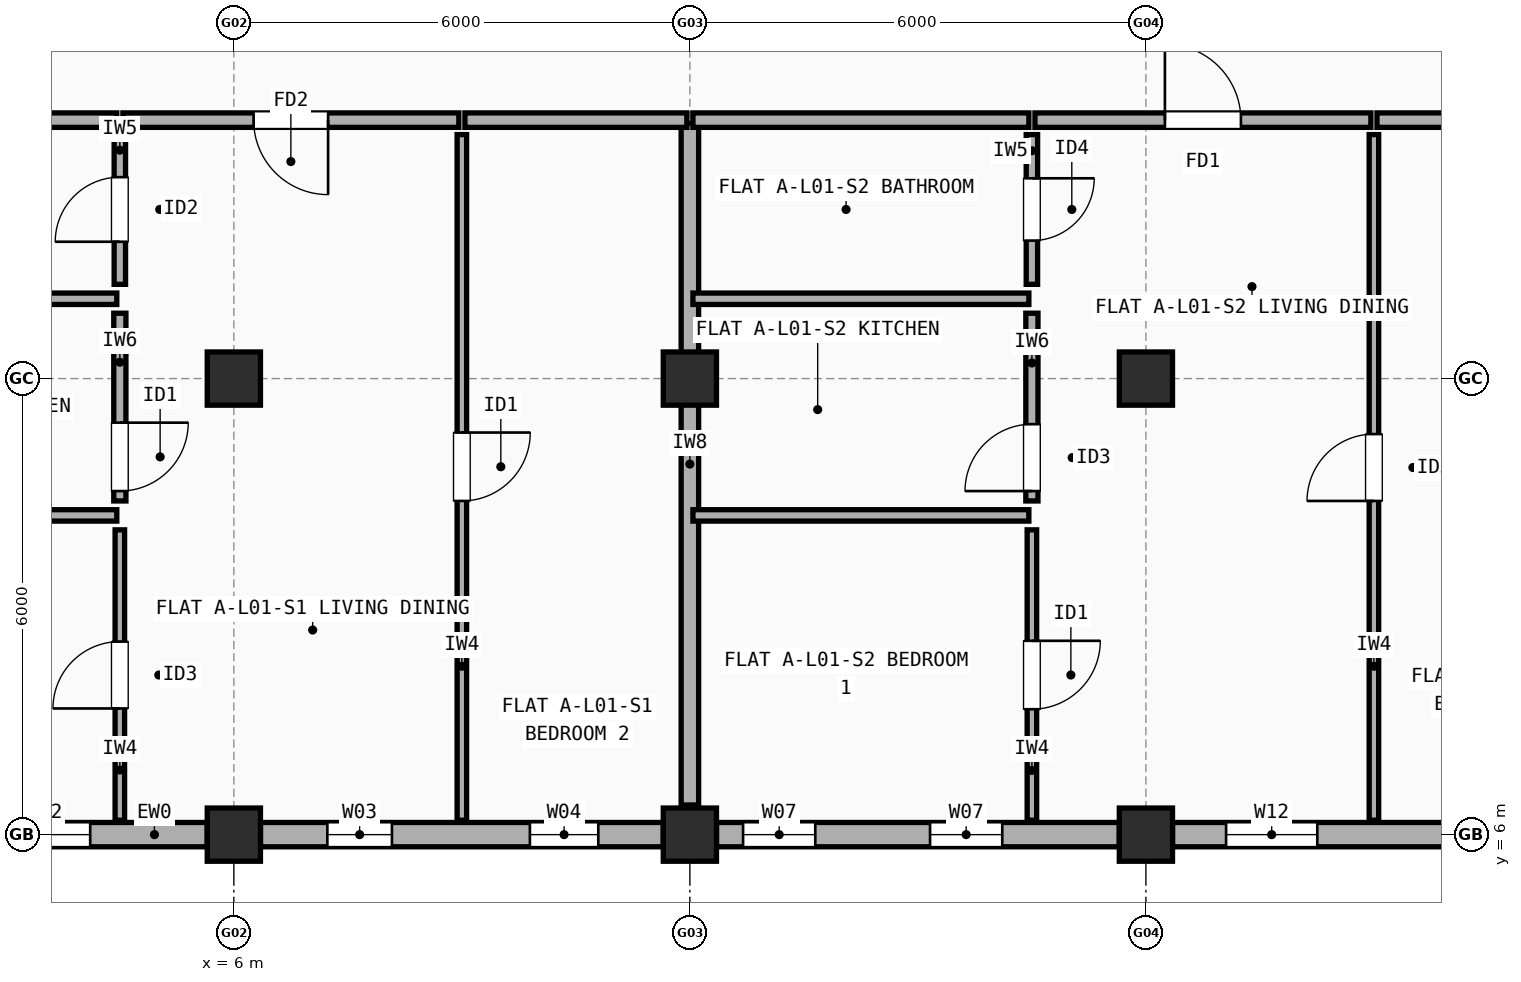
"""IFC4 building model, lengths in metres.
Left out: names, types, materials, properties, quantities, classifications, styles, units other than length and angle.
Written with IfcOpenShell. Run it as: python <this file> out.ifc"""

import sys

from ifc_helpers import new_model, si_unit, direction, frame, frame_2d, origin, origin_2d, place, context, subcontext, project, spatial, rectangle, extrude, element, fill, save


model = new_model("IFC4")
c1 = context("Model", 3, precision=1e-05, world=origin(), true_north=direction((0.0, 1.0)))
c2 = subcontext(c1, "Body", "Model", "MODEL_VIEW")
j1 = project(units=[si_unit("LENGTHUNIT", "METRE"), si_unit("PLANEANGLEUNIT", "RADIAN")], contexts=[c1])
p1 = place(None, origin())
s1 = spatial("IfcSite", under=j1, at=p1, CompositionType="ELEMENT")
p2 = place(p1, origin())
s2 = spatial("IfcBuilding", under=s1, at=p2, CompositionType="ELEMENT")
p3 = place(p2, frame((0.0, 0.0, 4.5)))
s3 = spatial("IfcBuildingStorey", under=s2, at=p3, CompositionType="ELEMENT", Elevation=4.5)
for number, where, z_axis, x_axis in (
    (1, (6.0, 6.0, 0.0), (0.0, 0.0, 1.0), (1.0, 0.0, 0.0)),
    (2, (6.0, 12.0, 0.0), (0.0, 0.0, 1.0), (1.0, 0.0, 0.0)),
    (3, (12.0, 6.0, 0.0), (0.0, 0.0, 1.0), (1.0, 0.0, 0.0)),
    (4, (12.0, 12.0, 0.0), (0.0, 0.0, 1.0), (1.0, 0.0, 0.0)),
    (5, (18.0, 6.0, 0.0), (0.0, 0.0, 1.0), (1.0, 0.0, 0.0)),
    (6, (18.0, 12.0, 0.0), (0.0, 0.0, 1.0), (1.0, 0.0, 0.0)),
):
    element("IfcColumn", number, at=place(p3, frame(where, z_axis=z_axis, x_axis=x_axis)), inside=s3, PredefinedType="COLUMN", context=c2, shape_type="SweptSolid", body=[
        extrude(rectangle(XDim=0.7, YDim=0.7, at=origin_2d()), origin(), (0.0, 0.0, 1.0), 2.945),
    ])
p4 = place(p3, frame((0.3, 6.0, 0.0), z_axis=(0.0, 0.0, 1.0), x_axis=(1.0, 0.0, 0.0)))
e7 = element("IfcWall", 7, at=p4, inside=s3, PredefinedType="STANDARD", context=c2, shape_type="SweptSolid", body=[
    extrude(rectangle(XDim=5.35, YDim=0.32, at=frame_2d((2.675, 0.0))), origin(), (0.0, 0.0, 1.0), 2.427),
])
p5 = place(p4, frame((0.35, 0.0, 0.9)))
e8 = element("IfcOpeningElement", 8, at=p5, cuts=e7, PredefinedType="OPENING", context=c2, shape_type="SweptSolid", body=[
    extrude(rectangle(XDim=1.2, YDim=1.35, at=frame_2d((0.6, 0.675))), frame((0.0, 0.17, 0.0), z_axis=(0.0, -1.0, 0.0), x_axis=(1.0, 0.0, 0.0)), (0.0, 0.0, 1.0), 0.34),
])
p6 = place(p4, frame((2.61, 0.0, 0.9)))
e9 = element("IfcOpeningElement", 9, at=p6, cuts=e7, PredefinedType="OPENING", context=c2, shape_type="SweptSolid", body=[
    extrude(rectangle(XDim=1.2, YDim=1.35, at=frame_2d((0.6, 0.675))), frame((0.0, 0.17, 0.0), z_axis=(0.0, -1.0, 0.0), x_axis=(1.0, 0.0, 0.0)), (0.0, 0.0, 1.0), 0.34),
])
p7 = place(p3, frame((6.35, 6.0, 0.0), z_axis=(0.0, 0.0, 1.0), x_axis=(1.0, 0.0, 0.0)))
e10 = element("IfcWall", 10, at=p7, inside=s3, PredefinedType="STANDARD", context=c2, shape_type="SweptSolid", body=[
    extrude(rectangle(XDim=5.3, YDim=0.32, at=frame_2d((2.65, 0.0))), origin(), (0.0, 0.0, 1.0), 2.427),
])
p8 = place(p7, frame((0.88, 0.0, 0.9)))
e11 = element("IfcOpeningElement", 11, at=p8, cuts=e10, PredefinedType="OPENING", context=c2, shape_type="SweptSolid", body=[
    extrude(rectangle(XDim=0.85, YDim=1.25, at=frame_2d((0.425, 0.625))), frame((0.0, 0.17, 0.0), z_axis=(0.0, -1.0, 0.0), x_axis=(1.0, 0.0, 0.0)), (0.0, 0.0, 1.0), 0.34),
])
p9 = place(p7, frame((3.545, 0.0, 0.9)))
e12 = element("IfcOpeningElement", 12, at=p9, cuts=e10, PredefinedType="OPENING", context=c2, shape_type="SweptSolid", body=[
    extrude(rectangle(XDim=0.9, YDim=1.3, at=frame_2d((0.45, 0.65))), frame((0.0, 0.17, 0.0), z_axis=(0.0, -1.0, 0.0), x_axis=(1.0, 0.0, 0.0)), (0.0, 0.0, 1.0), 0.34),
])
p10 = place(p3, frame((12.35, 6.0, 0.0), z_axis=(0.0, 0.0, 1.0), x_axis=(1.0, 0.0, 0.0)))
e13 = element("IfcWall", 13, at=p10, inside=s3, PredefinedType="STANDARD", context=c2, shape_type="SweptSolid", body=[
    extrude(rectangle(XDim=5.3, YDim=0.32, at=frame_2d((2.65, 0.0))), origin(), (0.0, 0.0, 1.0), 2.427),
])
p11 = place(p10, frame((0.35, 0.0, 0.9)))
e14 = element("IfcOpeningElement", 14, at=p11, cuts=e13, PredefinedType="OPENING", context=c2, shape_type="SweptSolid", body=[
    extrude(rectangle(XDim=0.95, YDim=1.35, at=frame_2d((0.475, 0.675))), frame((0.0, 0.17, 0.0), z_axis=(0.0, -1.0, 0.0), x_axis=(1.0, 0.0, 0.0)), (0.0, 0.0, 1.0), 0.34),
])
p12 = place(p10, frame((2.81, 0.0, 0.9)))
e15 = element("IfcOpeningElement", 15, at=p12, cuts=e13, PredefinedType="OPENING", context=c2, shape_type="SweptSolid", body=[
    extrude(rectangle(XDim=0.95, YDim=1.35, at=frame_2d((0.475, 0.675))), frame((0.0, 0.17, 0.0), z_axis=(0.0, -1.0, 0.0), x_axis=(1.0, 0.0, 0.0)), (0.0, 0.0, 1.0), 0.34),
])
p13 = place(p3, frame((18.35, 6.0, 0.0), z_axis=(0.0, 0.0, 1.0), x_axis=(1.0, 0.0, 0.0)))
e16 = element("IfcWall", 16, at=p13, inside=s3, PredefinedType="STANDARD", context=c2, shape_type="SweptSolid", body=[
    extrude(rectangle(XDim=5.3, YDim=0.32, at=frame_2d((2.65, 0.0))), origin(), (0.0, 0.0, 1.0), 2.427),
])
p14 = place(p13, frame((0.705, 0.0, 0.9)))
e17 = element("IfcOpeningElement", 17, at=p14, cuts=e16, PredefinedType="OPENING", context=c2, shape_type="SweptSolid", body=[
    extrude(rectangle(XDim=1.2, YDim=1.35, at=frame_2d((0.6, 0.675))), frame((0.0, 0.17, 0.0), z_axis=(0.0, -1.0, 0.0), x_axis=(1.0, 0.0, 0.0)), (0.0, 0.0, 1.0), 0.34),
])
p15 = place(p13, frame((3.595, 0.0, 0.9)))
e18 = element("IfcOpeningElement", 18, at=p15, cuts=e16, PredefinedType="OPENING", context=c2, shape_type="SweptSolid", body=[
    extrude(rectangle(XDim=0.8, YDim=1.2, at=frame_2d((0.4, 0.6))), frame((0.0, 0.17, 0.0), z_axis=(0.0, -1.0, 0.0), x_axis=(1.0, 0.0, 0.0)), (0.0, 0.0, 1.0), 0.34),
])
p16 = place(p3, frame((12.0, 6.39, 0.0), z_axis=(0.0, 0.0, 1.0), x_axis=(0.0, 1.0, 0.0)))
e19 = element("IfcWall", 19, at=p16, inside=s3, PredefinedType="SOLIDWALL", context=c2, shape_type="SweptSolid", body=[
    extrude(rectangle(XDim=8.97, YDim=0.23, at=frame_2d((4.485, 0.0))), origin(), (0.0, 0.0, 1.0), 2.327),
])
p17 = place(p3, frame((0.04, 15.4, 0.0), z_axis=(0.0, 0.0, 1.0), x_axis=(1.0, 0.0, 0.0)))
e20 = element("IfcWall", 20, at=p17, inside=s3, PredefinedType="SOLIDWALL", context=c2, shape_type="SweptSolid", body=[
    extrude(rectangle(XDim=4.42, YDim=0.19, at=frame_2d((2.21, 0.0))), origin(), (0.0, 0.0, 1.0), 2.427),
])
p18 = place(p3, frame((4.54, 15.4, 0.0), z_axis=(0.0, 0.0, 1.0), x_axis=(1.0, 0.0, 0.0)))
e21 = element("IfcWall", 21, at=p18, inside=s3, PredefinedType="SOLIDWALL", context=c2, shape_type="SweptSolid", body=[
    extrude(rectangle(XDim=4.42, YDim=0.19, at=frame_2d((2.21, 0.0))), origin(), (0.0, 0.0, 1.0), 2.327),
])
p19 = place(p18, frame((1.72, 0.0, 0.0)))
e22 = element("IfcOpeningElement", 22, at=p19, cuts=e21, PredefinedType="OPENING", context=c2, shape_type="SweptSolid", body=[
    extrude(rectangle(XDim=0.98, YDim=2.15, at=frame_2d((0.49, 1.075))), frame((0.0, 0.105, 0.0), z_axis=(0.0, -1.0, 0.0), x_axis=(1.0, 0.0, 0.0)), (0.0, 0.0, 1.0), 0.21),
])
p20 = place(p3, frame((4.5, 6.19, 0.0), z_axis=(0.0, 0.0, 1.0), x_axis=(0.0, 1.0, 0.0)))
e23 = element("IfcWall", 23, at=p20, inside=s3, PredefinedType="PARTITIONING", context=c2, shape_type="SweptSolid", body=[
    extrude(rectangle(XDim=3.82, YDim=0.125, at=frame_2d((1.91, 0.0))), origin(), (0.0, 0.0, 1.0), 2.945),
])
p21 = place(p20, frame((1.47, 0.0, 0.0)))
e24 = element("IfcOpeningElement", 24, at=p21, cuts=e23, PredefinedType="OPENING", context=c2, shape_type="SweptSolid", body=[
    extrude(rectangle(XDim=0.88, YDim=2.1, at=frame_2d((0.44, 1.05))), frame((0.0, 0.073, 0.0), z_axis=(0.0, -1.0, 0.0), x_axis=(1.0, 0.0, 0.0)), (0.0, 0.0, 1.0), 0.145),
])
p22 = place(p3, frame((4.5, 10.39, 0.0), z_axis=(0.0, 0.0, 1.0), x_axis=(0.0, 1.0, 0.0)))
e25 = element("IfcWall", 25, at=p22, inside=s3, PredefinedType="PLUMBINGWALL", context=c2, shape_type="SweptSolid", body=[
    extrude(rectangle(XDim=2.47, YDim=0.16, at=frame_2d((1.235, 0.0))), origin(), (0.0, 0.0, 1.0), 2.377),
])
p23 = place(p22, frame((0.13, 0.0, 0.0)))
e26 = element("IfcOpeningElement", 26, at=p23, cuts=e25, PredefinedType="OPENING", context=c2, shape_type="SweptSolid", body=[
    extrude(rectangle(XDim=0.9, YDim=2.1, at=frame_2d((0.45, 1.05))), frame((0.0, 0.09, 0.0), z_axis=(0.0, -1.0, 0.0), x_axis=(1.0, 0.0, 0.0)), (0.0, 0.0, 1.0), 0.18),
])
p24 = place(p3, frame((4.5, 13.24, 0.0), z_axis=(0.0, 0.0, 1.0), x_axis=(0.0, 1.0, 0.0)))
e27 = element("IfcWall", 27, at=p24, inside=s3, PredefinedType="PARTITIONING", context=c2, shape_type="SweptSolid", body=[
    extrude(rectangle(XDim=1.97, YDim=0.15, at=frame_2d((0.985, 0.0))), origin(), (0.0, 0.0, 1.0), 2.945),
])
p25 = place(p24, frame((0.56, 0.0, 0.0)))
e28 = element("IfcOpeningElement", 28, at=p25, cuts=e27, PredefinedType="OPENING", context=c2, shape_type="SweptSolid", body=[
    extrude(rectangle(XDim=0.85, YDim=2.1, at=frame_2d((0.425, 1.05))), frame((0.0, 0.085, 0.0), z_axis=(0.0, -1.0, 0.0), x_axis=(1.0, 0.0, 0.0)), (0.0, 0.0, 1.0), 0.17),
])
for number, where, z_axis, x_axis in (
    (29, (0.04, 10.2, 0.0), (0.0, 0.0, 1.0), (1.0, 0.0, 0.0)),
    (30, (0.04, 13.05, 0.0), (0.0, 0.0, 1.0), (1.0, 0.0, 0.0)),
):
    element("IfcWall", number, at=place(p3, frame(where, z_axis=z_axis, x_axis=x_axis)), inside=s3, PredefinedType="PARTITIONING", context=c2, shape_type="SweptSolid", body=[
        extrude(rectangle(XDim=4.42, YDim=0.15, at=frame_2d((2.21, 0.0))), origin(), (0.0, 0.0, 1.0), 2.427),
    ])
p26 = place(p3, frame((9.04, 15.4, 0.0), z_axis=(0.0, 0.0, 1.0), x_axis=(1.0, 0.0, 0.0)))
e31 = element("IfcWall", 31, at=p26, inside=s3, PredefinedType="SOLIDWALL", context=c2, shape_type="SweptSolid", body=[
    extrude(rectangle(XDim=2.92, YDim=0.19, at=frame_2d((1.46, 0.0))), origin(), (0.0, 0.0, 1.0), 2.327),
])
p27 = place(p3, frame((9.0, 6.19, 0.0), z_axis=(0.0, 0.0, 1.0), x_axis=(0.0, 1.0, 0.0)))
e32 = element("IfcWall", 32, at=p27, inside=s3, PredefinedType="PARTITIONING", context=c2, shape_type="SweptSolid", body=[
    extrude(rectangle(XDim=9.02, YDim=0.125, at=frame_2d((4.51, 0.0))), origin(), (0.0, 0.0, 1.0), 2.377),
])
p28 = place(p27, frame((4.2, 0.0, 0.0)))
e33 = element("IfcOpeningElement", 33, at=p28, cuts=e32, PredefinedType="OPENING", context=c2, shape_type="SweptSolid", body=[
    extrude(rectangle(XDim=0.9, YDim=2.1, at=frame_2d((0.45, 1.05))), frame((0.0, 0.073, 0.0), z_axis=(0.0, -1.0, 0.0), x_axis=(1.0, 0.0, 0.0)), (0.0, 0.0, 1.0), 0.145),
])
p29 = place(p3, frame((12.04, 15.4, 0.0), z_axis=(0.0, 0.0, 1.0), x_axis=(1.0, 0.0, 0.0)))
e34 = element("IfcWall", 34, at=p29, inside=s3, PredefinedType="SOLIDWALL", context=c2, shape_type="SweptSolid", body=[
    extrude(rectangle(XDim=4.42, YDim=0.19, at=frame_2d((2.21, 0.0))), origin(), (0.0, 0.0, 1.0), 2.327),
])
p30 = place(p3, frame((16.54, 15.4, 0.0), z_axis=(0.0, 0.0, 1.0), x_axis=(1.0, 0.0, 0.0)))
e35 = element("IfcWall", 35, at=p30, inside=s3, PredefinedType="SOLIDWALL", context=c2, shape_type="SweptSolid", body=[
    extrude(rectangle(XDim=4.42, YDim=0.19, at=frame_2d((2.21, 0.0))), origin(), (0.0, 0.0, 1.0), 2.327),
])
p31 = place(p30, frame((1.71, 0.0, 0.0)))
e36 = element("IfcOpeningElement", 36, at=p31, cuts=e35, PredefinedType="OPENING", context=c2, shape_type="SweptSolid", body=[
    extrude(rectangle(XDim=1.0, YDim=2.15, at=frame_2d((0.5, 1.075))), frame((0.0, 0.105, 0.0), z_axis=(0.0, -1.0, 0.0), x_axis=(1.0, 0.0, 0.0)), (0.0, 0.0, 1.0), 0.21),
])
p32 = place(p3, frame((16.5, 6.19, 0.0), z_axis=(0.0, 0.0, 1.0), x_axis=(0.0, 1.0, 0.0)))
e37 = element("IfcWall", 37, at=p32, inside=s3, PredefinedType="PARTITIONING", context=c2, shape_type="SweptSolid", body=[
    extrude(rectangle(XDim=3.82, YDim=0.125, at=frame_2d((1.91, 0.0))), origin(), (0.0, 0.0, 1.0), 2.945),
])
p33 = place(p32, frame((1.46, 0.0, 0.0)))
e38 = element("IfcOpeningElement", 38, at=p33, cuts=e37, PredefinedType="OPENING", context=c2, shape_type="SweptSolid", body=[
    extrude(rectangle(XDim=0.9, YDim=2.1, at=frame_2d((0.45, 1.05))), frame((0.0, 0.073, 0.0), z_axis=(0.0, -1.0, 0.0), x_axis=(1.0, 0.0, 0.0)), (0.0, 0.0, 1.0), 0.145),
])
p34 = place(p3, frame((16.5, 10.39, 0.0), z_axis=(0.0, 0.0, 1.0), x_axis=(0.0, 1.0, 0.0)))
e39 = element("IfcWall", 39, at=p34, inside=s3, PredefinedType="PLUMBINGWALL", context=c2, shape_type="SweptSolid", body=[
    extrude(rectangle(XDim=2.47, YDim=0.16, at=frame_2d((1.235, 0.0))), origin(), (0.0, 0.0, 1.0), 2.377),
])
p35 = place(p34, frame((0.13, 0.0, 0.0)))
e40 = element("IfcOpeningElement", 40, at=p35, cuts=e39, PredefinedType="OPENING", context=c2, shape_type="SweptSolid", body=[
    extrude(rectangle(XDim=0.88, YDim=2.1, at=frame_2d((0.44, 1.05))), frame((0.0, 0.09, 0.0), z_axis=(0.0, -1.0, 0.0), x_axis=(1.0, 0.0, 0.0)), (0.0, 0.0, 1.0), 0.18),
])
p36 = place(p3, frame((16.5, 13.24, 0.0), z_axis=(0.0, 0.0, 1.0), x_axis=(0.0, 1.0, 0.0)))
e41 = element("IfcWall", 41, at=p36, inside=s3, PredefinedType="PARTITIONING", context=c2, shape_type="SweptSolid", body=[
    extrude(rectangle(XDim=1.97, YDim=0.15, at=frame_2d((0.985, 0.0))), origin(), (0.0, 0.0, 1.0), 2.945),
])
p37 = place(p36, frame((0.575, 0.0, 0.0)))
e42 = element("IfcOpeningElement", 42, at=p37, cuts=e41, PredefinedType="OPENING", context=c2, shape_type="SweptSolid", body=[
    extrude(rectangle(XDim=0.82, YDim=2.08, at=frame_2d((0.41, 1.04))), frame((0.0, 0.085, 0.0), z_axis=(0.0, -1.0, 0.0), x_axis=(1.0, 0.0, 0.0)), (0.0, 0.0, 1.0), 0.17),
])
for number, where, z_axis, x_axis in (
    (43, (12.04, 10.2, 0.0), (0.0, 0.0, 1.0), (1.0, 0.0, 0.0)),
    (44, (12.04, 13.05, 0.0), (0.0, 0.0, 1.0), (1.0, 0.0, 0.0)),
):
    element("IfcWall", number, at=place(p3, frame(where, z_axis=z_axis, x_axis=x_axis)), inside=s3, PredefinedType="PARTITIONING", context=c2, shape_type="SweptSolid", body=[
        extrude(rectangle(XDim=4.42, YDim=0.15, at=frame_2d((2.21, 0.0))), origin(), (0.0, 0.0, 1.0), 2.327),
    ])
p38 = place(p3, frame((21.04, 15.4, 0.0), z_axis=(0.0, 0.0, 1.0), x_axis=(1.0, 0.0, 0.0)))
e45 = element("IfcWall", 45, at=p38, inside=s3, PredefinedType="SOLIDWALL", context=c2, shape_type="SweptSolid", body=[
    extrude(rectangle(XDim=2.92, YDim=0.19, at=frame_2d((1.46, 0.0))), origin(), (0.0, 0.0, 1.0), 2.327),
])
p39 = place(p3, frame((21.0, 6.19, 0.0), z_axis=(0.0, 0.0, 1.0), x_axis=(0.0, 1.0, 0.0)))
e46 = element("IfcWall", 46, at=p39, inside=s3, PredefinedType="PARTITIONING", context=c2, shape_type="SweptSolid", body=[
    extrude(rectangle(XDim=9.02, YDim=0.125, at=frame_2d((4.51, 0.0))), origin(), (0.0, 0.0, 1.0), 2.377),
])
p40 = place(p39, frame((4.2, 0.0, 0.0)))
e47 = element("IfcOpeningElement", 47, at=p40, cuts=e46, PredefinedType="OPENING", context=c2, shape_type="SweptSolid", body=[
    extrude(rectangle(XDim=0.88, YDim=2.1, at=frame_2d((0.44, 1.05))), frame((0.0, 0.073, 0.0), z_axis=(0.0, -1.0, 0.0), x_axis=(1.0, 0.0, 0.0)), (0.0, 0.0, 1.0), 0.145),
])
p41 = place(p6, origin())
e48 = element("IfcWindow", 48, at=p41, inside=s3, PartitioningType="SINGLE_PANEL", PredefinedType="WINDOW", context=c2, shape_type="SweptSolid", body=[
    extrude(rectangle(XDim=1.2, YDim=1.35, at=frame_2d((0.6, 0.675))), frame((0.0, 0.03, 0.0), z_axis=(0.0, -1.0, 0.0), x_axis=(1.0, 0.0, 0.0)), (0.0, 0.0, 1.0), 0.06),
])
fill(e9, e48)
p42 = place(p8, origin())
e49 = element("IfcWindow", 49, at=p42, inside=s3, PartitioningType="SINGLE_PANEL", PredefinedType="WINDOW", context=c2, shape_type="SweptSolid", body=[
    extrude(rectangle(XDim=0.85, YDim=1.25, at=frame_2d((0.425, 0.625))), frame((0.0, 0.03, 0.0), z_axis=(0.0, -1.0, 0.0), x_axis=(1.0, 0.0, 0.0)), (0.0, 0.0, 1.0), 0.06),
])
fill(e11, e49)
p43 = place(p9, origin())
e50 = element("IfcWindow", 50, at=p43, inside=s3, PartitioningType="SINGLE_PANEL", PredefinedType="WINDOW", context=c2, shape_type="SweptSolid", body=[
    extrude(rectangle(XDim=0.9, YDim=1.3, at=frame_2d((0.45, 0.65))), frame((0.0, 0.03, 0.0), z_axis=(0.0, -1.0, 0.0), x_axis=(1.0, 0.0, 0.0)), (0.0, 0.0, 1.0), 0.06),
])
fill(e12, e50)
p44 = place(p11, origin())
e51 = element("IfcWindow", 51, at=p44, inside=s3, PartitioningType="SINGLE_PANEL", PredefinedType="WINDOW", context=c2, shape_type="SweptSolid", body=[
    extrude(rectangle(XDim=0.95, YDim=1.35, at=frame_2d((0.475, 0.675))), frame((0.0, 0.03, 0.0), z_axis=(0.0, -1.0, 0.0), x_axis=(1.0, 0.0, 0.0)), (0.0, 0.0, 1.0), 0.06),
])
fill(e14, e51)
p45 = place(p12, origin())
e52 = element("IfcWindow", 52, at=p45, inside=s3, PartitioningType="SINGLE_PANEL", PredefinedType="WINDOW", context=c2, shape_type="SweptSolid", body=[
    extrude(rectangle(XDim=0.95, YDim=1.35, at=frame_2d((0.475, 0.675))), frame((0.0, 0.03, 0.0), z_axis=(0.0, -1.0, 0.0), x_axis=(1.0, 0.0, 0.0)), (0.0, 0.0, 1.0), 0.06),
])
fill(e15, e52)
p46 = place(p14, origin())
e53 = element("IfcWindow", 53, at=p46, inside=s3, PartitioningType="SINGLE_PANEL", PredefinedType="WINDOW", context=c2, shape_type="SweptSolid", body=[
    extrude(rectangle(XDim=1.2, YDim=1.35, at=frame_2d((0.6, 0.675))), frame((0.0, 0.03, 0.0), z_axis=(0.0, -1.0, 0.0), x_axis=(1.0, 0.0, 0.0)), (0.0, 0.0, 1.0), 0.06),
])
fill(e17, e53)
p47 = place(p19, origin())
e54 = element("IfcDoor", 54, at=p47, inside=s3, OperationType="SINGLE_SWING_RIGHT", PredefinedType="DOOR", context=c2, shape_type="SweptSolid", body=[
    extrude(rectangle(XDim=0.98, YDim=2.15, at=frame_2d((0.49, 1.075))), frame((0.0, 0.025, 0.0), z_axis=(0.0, -1.0, 0.0), x_axis=(1.0, 0.0, 0.0)), (0.0, 0.0, 1.0), 0.05),
])
fill(e22, e54)
p48 = place(p21, origin())
e55 = element("IfcDoor", 55, at=p48, inside=s3, OperationType="SINGLE_SWING_LEFT", PredefinedType="DOOR", context=c2, shape_type="SweptSolid", body=[
    extrude(rectangle(XDim=0.88, YDim=2.1, at=frame_2d((0.44, 1.05))), frame((0.0, 0.025, 0.0), z_axis=(0.0, -1.0, 0.0), x_axis=(1.0, 0.0, 0.0)), (0.0, 0.0, 1.0), 0.05),
])
fill(e24, e55)
p49 = place(p23, origin())
e56 = element("IfcDoor", 56, at=p49, inside=s3, OperationType="SINGLE_SWING_RIGHT", PredefinedType="DOOR", context=c2, shape_type="SweptSolid", body=[
    extrude(rectangle(XDim=0.9, YDim=2.1, at=frame_2d((0.45, 1.05))), frame((0.0, 0.025, 0.0), z_axis=(0.0, -1.0, 0.0), x_axis=(1.0, 0.0, 0.0)), (0.0, 0.0, 1.0), 0.05),
])
fill(e26, e56)
p50 = place(p25, origin())
e57 = element("IfcDoor", 57, at=p50, inside=s3, OperationType="SINGLE_SWING_LEFT", PredefinedType="DOOR", context=c2, shape_type="SweptSolid", body=[
    extrude(rectangle(XDim=0.85, YDim=2.1, at=frame_2d((0.425, 1.05))), frame((0.0, 0.025, 0.0), z_axis=(0.0, -1.0, 0.0), x_axis=(1.0, 0.0, 0.0)), (0.0, 0.0, 1.0), 0.05),
])
fill(e28, e57)
p51 = place(p28, origin())
e58 = element("IfcDoor", 58, at=p51, inside=s3, OperationType="SINGLE_SWING_RIGHT", PredefinedType="DOOR", context=c2, shape_type="SweptSolid", body=[
    extrude(rectangle(XDim=0.9, YDim=2.1, at=frame_2d((0.45, 1.05))), frame((0.0, 0.025, 0.0), z_axis=(0.0, -1.0, 0.0), x_axis=(1.0, 0.0, 0.0)), (0.0, 0.0, 1.0), 0.05),
])
fill(e33, e58)
p52 = place(p31, origin())
e59 = element("IfcDoor", 59, at=p52, inside=s3, OperationType="SINGLE_SWING_LEFT", PredefinedType="DOOR", context=c2, shape_type="SweptSolid", body=[
    extrude(rectangle(XDim=1.0, YDim=2.15, at=frame_2d((0.5, 1.075))), frame((0.0, 0.025, 0.0), z_axis=(0.0, -1.0, 0.0), x_axis=(1.0, 0.0, 0.0)), (0.0, 0.0, 1.0), 0.05),
])
fill(e36, e59)
p53 = place(p33, origin())
e60 = element("IfcDoor", 60, at=p53, inside=s3, OperationType="SINGLE_SWING_RIGHT", PredefinedType="DOOR", context=c2, shape_type="SweptSolid", body=[
    extrude(rectangle(XDim=0.9, YDim=2.1, at=frame_2d((0.45, 1.05))), frame((0.0, 0.025, 0.0), z_axis=(0.0, -1.0, 0.0), x_axis=(1.0, 0.0, 0.0)), (0.0, 0.0, 1.0), 0.05),
])
fill(e38, e60)
p54 = place(p35, origin())
e61 = element("IfcDoor", 61, at=p54, inside=s3, OperationType="SINGLE_SWING_LEFT", PredefinedType="DOOR", context=c2, shape_type="SweptSolid", body=[
    extrude(rectangle(XDim=0.88, YDim=2.1, at=frame_2d((0.44, 1.05))), frame((0.0, 0.025, 0.0), z_axis=(0.0, -1.0, 0.0), x_axis=(1.0, 0.0, 0.0)), (0.0, 0.0, 1.0), 0.05),
])
fill(e40, e61)
p55 = place(p37, origin())
e62 = element("IfcDoor", 62, at=p55, inside=s3, OperationType="SINGLE_SWING_RIGHT", PredefinedType="DOOR", context=c2, shape_type="SweptSolid", body=[
    extrude(rectangle(XDim=0.82, YDim=2.08, at=frame_2d((0.41, 1.04))), frame((0.0, 0.025, 0.0), z_axis=(0.0, -1.0, 0.0), x_axis=(1.0, 0.0, 0.0)), (0.0, 0.0, 1.0), 0.05),
])
fill(e42, e62)
p56 = place(p40, origin())
e63 = element("IfcDoor", 63, at=p56, inside=s3, OperationType="SINGLE_SWING_LEFT", PredefinedType="DOOR", context=c2, shape_type="SweptSolid", body=[
    extrude(rectangle(XDim=0.88, YDim=2.1, at=frame_2d((0.44, 1.05))), frame((0.0, 0.025, 0.0), z_axis=(0.0, -1.0, 0.0), x_axis=(1.0, 0.0, 0.0)), (0.0, 0.0, 1.0), 0.05),
])
fill(e47, e63)
save(model, sys.argv[1])
